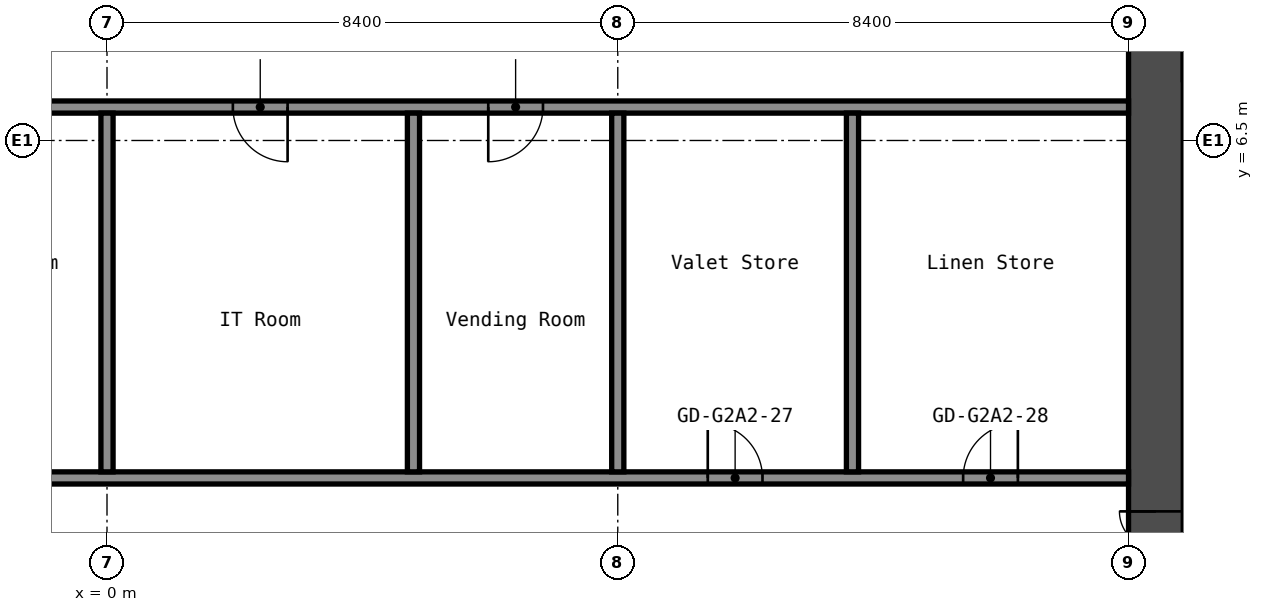
"""IFC4 building model, lengths in metres.
Left out: names, types, materials, properties, quantities, classifications, styles, units other than length and angle.
Written with IfcOpenShell. Run it as: python <this file> out.ifc"""

import sys

from ifc_helpers import new_model, si_unit, direction, frame, frame_2d, origin, place, context, subcontext, project, spatial, rectangle, extrude, element, fill, save


model = new_model("IFC4")
c1 = context("Model", 3, precision=1e-05, world=origin(), true_north=direction((0.0, 1.0)))
c2 = subcontext(c1, "Body", "Model", "MODEL_VIEW")
j1 = project(units=[si_unit("LENGTHUNIT", "METRE"), si_unit("PLANEANGLEUNIT", "RADIAN")], contexts=[c1])
p1 = place(None, origin())
s1 = spatial("IfcSite", under=j1, at=p1, CompositionType="ELEMENT")
p2 = place(p1, origin())
s2 = spatial("IfcBuilding", under=s1, at=p2, CompositionType="ELEMENT")
p3 = place(p2, frame((0.0, 0.0, 107.4)))
s3 = spatial("IfcBuildingStorey", under=s2, at=p3, CompositionType="ELEMENT", Elevation=107.4)
p4 = place(p3, frame((17.25, -8.4, 0.0), z_axis=(0.0, 0.0, 1.0), x_axis=(0.0, 1.0, 0.0)))
e1 = element("IfcWall", 1, at=p4, inside=s3, PredefinedType="SHEAR", context=c2, shape_type="SweptSolid", body=[
    extrude(rectangle(XDim=16.8, YDim=0.9, at=frame_2d((8.4, 0.0))), origin(), (0.0, 0.0, 1.0), 2.8),
])
p5 = place(p4, frame((7.6, 0.0, 0.0)))
e2 = element("IfcOpeningElement", 2, at=p5, cuts=e1, PredefinedType="OPENING", context=c2, shape_type="SweptSolid", body=[
    extrude(rectangle(XDim=1.2, YDim=2.1, at=frame_2d((0.6, 1.05))), frame((0.0, 0.46, 0.0), z_axis=(0.0, -1.0, 0.0), x_axis=(1.0, 0.0, 0.0)), (0.0, 0.0, 1.0), 0.92),
])
p6 = place(p3, frame((17.7, 7.95, 0.0), z_axis=(0.0, 0.0, 1.0), x_axis=(1.0, 0.0, 0.0)))
e3 = element("IfcWall", 3, at=p6, inside=s3, PredefinedType="SHEAR", context=c2, shape_type="SweptSolid", body=[
    extrude(rectangle(XDim=15.0, YDim=0.9, at=frame_2d((7.5, 0.0))), origin(), (0.0, 0.0, 1.0), 2.8),
])
p7 = place(p6, frame((10.4, 0.0, 0.0)))
e4 = element("IfcOpeningElement", 4, at=p7, cuts=e3, PredefinedType="OPENING", context=c2, shape_type="SweptSolid", body=[
    extrude(rectangle(XDim=1.2, YDim=2.1, at=frame_2d((0.6, 1.05))), frame((0.0, 0.46, 0.0), z_axis=(0.0, -1.0, 0.0), x_axis=(1.0, 0.0, 0.0)), (0.0, 0.0, 1.0), 0.92),
])
p8 = place(p6, frame((13.35, 0.0, 0.0)))
e5 = element("IfcOpeningElement", 5, at=p8, cuts=e3, PredefinedType="OPENING", context=c2, shape_type="SweptSolid", body=[
    extrude(rectangle(XDim=0.9, YDim=2.1, at=frame_2d((0.45, 1.05))), frame((0.0, 0.46, 0.0), z_axis=(0.0, -1.0, 0.0), x_axis=(1.0, 0.0, 0.0)), (0.0, 0.0, 1.0), 0.92),
])
p9 = place(p3, frame((-16.8, 0.95, 0.0), z_axis=(0.0, 0.0, 1.0), x_axis=(1.0, 0.0, 0.0)))
e6 = element("IfcWall", 6, at=p9, inside=s3, PredefinedType="PARTITIONING", context=c2, shape_type="SweptSolid", body=[
    extrude(rectangle(XDim=33.6, YDim=0.2, at=frame_2d((16.8, 0.0))), origin(), (0.0, 0.0, 1.0), 2.8),
])
p10 = place(p9, frame((9.715, 0.0, 0.0)))
e7 = element("IfcOpeningElement", 7, at=p10, cuts=e6, PredefinedType="OPENING", context=c2, shape_type="SweptSolid", body=[
    extrude(rectangle(XDim=0.9, YDim=2.1, at=frame_2d((0.45, 1.05))), frame((0.0, 0.11, 0.0), z_axis=(0.0, -1.0, 0.0), x_axis=(1.0, 0.0, 0.0)), (0.0, 0.0, 1.0), 0.22),
])
p11 = place(p9, frame((13.915, 0.0, 0.0)))
e8 = element("IfcOpeningElement", 8, at=p11, cuts=e6, PredefinedType="OPENING", context=c2, shape_type="SweptSolid", body=[
    extrude(rectangle(XDim=0.9, YDim=2.1, at=frame_2d((0.45, 1.05))), frame((0.0, 0.11, 0.0), z_axis=(0.0, -1.0, 0.0), x_axis=(1.0, 0.0, 0.0)), (0.0, 0.0, 1.0), 0.22),
])
p12 = place(p9, frame((26.68, 0.0, 0.0)))
e9 = element("IfcOpeningElement", 9, at=p12, cuts=e6, PredefinedType="OPENING", context=c2, shape_type="SweptSolid", body=[
    extrude(rectangle(XDim=0.9, YDim=2.1, at=frame_2d((0.45, 1.05))), frame((0.0, 0.11, 0.0), z_axis=(0.0, -1.0, 0.0), x_axis=(1.0, 0.0, 0.0)), (0.0, 0.0, 1.0), 0.22),
])
p13 = place(p9, frame((30.88, 0.0, 0.0)))
e10 = element("IfcOpeningElement", 10, at=p13, cuts=e6, PredefinedType="OPENING", context=c2, shape_type="SweptSolid", body=[
    extrude(rectangle(XDim=0.9, YDim=2.1, at=frame_2d((0.45, 1.05))), frame((0.0, 0.11, 0.0), z_axis=(0.0, -1.0, 0.0), x_axis=(1.0, 0.0, 0.0)), (0.0, 0.0, 1.0), 0.22),
])
p14 = place(p3, frame((-16.8, 7.05, 0.0), z_axis=(0.0, 0.0, 1.0), x_axis=(1.0, 0.0, 0.0)))
e11 = element("IfcWall", 11, at=p14, inside=s3, PredefinedType="PARTITIONING", context=c2, shape_type="SweptSolid", body=[
    extrude(rectangle(XDim=33.6, YDim=0.2, at=frame_2d((16.8, 0.0))), origin(), (0.0, 0.0, 1.0), 2.8),
])
p15 = place(p14, frame((1.9, 0.0, 0.0)))
e12 = element("IfcOpeningElement", 12, at=p15, cuts=e11, PredefinedType="OPENING", context=c2, shape_type="SweptSolid", body=[
    extrude(rectangle(XDim=0.9, YDim=2.1, at=frame_2d((0.45, 1.05))), frame((0.0, 0.11, 0.0), z_axis=(0.0, -1.0, 0.0), x_axis=(1.0, 0.0, 0.0)), (0.0, 0.0, 1.0), 0.22),
])
p16 = place(p14, frame((6.1, 0.0, 0.0)))
e13 = element("IfcOpeningElement", 13, at=p16, cuts=e11, PredefinedType="OPENING", context=c2, shape_type="SweptSolid", body=[
    extrude(rectangle(XDim=0.9, YDim=2.1, at=frame_2d((0.45, 1.05))), frame((0.0, 0.11, 0.0), z_axis=(0.0, -1.0, 0.0), x_axis=(1.0, 0.0, 0.0)), (0.0, 0.0, 1.0), 0.22),
])
p17 = place(p14, frame((18.87, 0.0, 0.0)))
e14 = element("IfcOpeningElement", 14, at=p17, cuts=e11, PredefinedType="OPENING", context=c2, shape_type="SweptSolid", body=[
    extrude(rectangle(XDim=0.9, YDim=2.1, at=frame_2d((0.45, 1.05))), frame((0.0, 0.11, 0.0), z_axis=(0.0, -1.0, 0.0), x_axis=(1.0, 0.0, 0.0)), (0.0, 0.0, 1.0), 0.22),
])
p18 = place(p14, frame((23.07, 0.0, 0.0)))
e15 = element("IfcOpeningElement", 15, at=p18, cuts=e11, PredefinedType="OPENING", context=c2, shape_type="SweptSolid", body=[
    extrude(rectangle(XDim=0.9, YDim=2.1, at=frame_2d((0.45, 1.05))), frame((0.0, 0.11, 0.0), z_axis=(0.0, -1.0, 0.0), x_axis=(1.0, 0.0, 0.0)), (0.0, 0.0, 1.0), 0.22),
])
for number, where, z_axis, x_axis in (
    (16, (0.0, 1.05, 0.0), (0.0, 0.0, 1.0), (0.0, 1.0, 0.0)),
    (17, (5.04, 1.05, 0.0), (0.0, 0.0, 1.0), (0.0, 1.0, 0.0)),
    (18, (8.4, 1.05, 0.0), (0.0, 0.0, 1.0), (0.0, 1.0, 0.0)),
    (19, (12.26, 1.05, 0.0), (0.0, 0.0, 1.0), (0.0, 1.0, 0.0)),
):
    element("IfcWall", number, at=place(p3, frame(where, z_axis=z_axis, x_axis=x_axis)), inside=s3, PredefinedType="PARTITIONING", context=c2, shape_type="SweptSolid", body=[
        extrude(rectangle(XDim=5.9, YDim=0.2, at=frame_2d((2.95, 0.0))), origin(), (0.0, 0.0, 1.0), 2.8),
    ])
p19 = place(p5, origin())
e20 = element("IfcDoor", 20, at=p19, inside=s3, OperationType="DOUBLE_DOOR_SINGLE_SWING", PredefinedType="DOOR", context=c2, shape_type="SweptSolid", body=[
    extrude(rectangle(XDim=1.2, YDim=2.1, at=frame_2d((0.6, 1.05))), frame((0.0, 0.025, 0.0), z_axis=(0.0, -1.0, 0.0), x_axis=(1.0, 0.0, 0.0)), (0.0, 0.0, 1.0), 0.05),
])
fill(e2, e20)
p20 = place(p12, origin())
e21 = element("IfcDoor", 21, at=p20, inside=s3, OperationType="SINGLE_SWING_RIGHT", PredefinedType="DOOR", context=c2, shape_type="SweptSolid", body=[
    extrude(rectangle(XDim=0.9, YDim=2.1, at=frame_2d((0.45, 1.05))), frame((0.0, 0.025, 0.0), z_axis=(0.0, -1.0, 0.0), x_axis=(1.0, 0.0, 0.0)), (0.0, 0.0, 1.0), 0.05),
])
fill(e9, e21)
p21 = place(p13, origin())
e22 = element("IfcDoor", 22, at=p21, inside=s3, OperationType="SINGLE_SWING_LEFT", PredefinedType="DOOR", context=c2, shape_type="SweptSolid", body=[
    extrude(rectangle(XDim=0.9, YDim=2.1, at=frame_2d((0.45, 1.05))), frame((0.0, 0.025, 0.0), z_axis=(0.0, -1.0, 0.0), x_axis=(1.0, 0.0, 0.0)), (0.0, 0.0, 1.0), 0.05),
])
fill(e10, e22)
p22 = place(p17, origin())
e23 = element("IfcDoor", 23, at=p22, inside=s3, OperationType="SINGLE_SWING_RIGHT", PredefinedType="DOOR", context=c2, shape_type="SweptSolid", body=[
    extrude(rectangle(XDim=0.9, YDim=2.1, at=frame_2d((0.45, 1.05))), frame((0.0, 0.025, 0.0), z_axis=(0.0, -1.0, 0.0), x_axis=(1.0, 0.0, 0.0)), (0.0, 0.0, 1.0), 0.05),
])
fill(e14, e23)
p23 = place(p18, origin())
e24 = element("IfcDoor", 24, at=p23, inside=s3, OperationType="SINGLE_SWING_LEFT", PredefinedType="DOOR", context=c2, shape_type="SweptSolid", body=[
    extrude(rectangle(XDim=0.9, YDim=2.1, at=frame_2d((0.45, 1.05))), frame((0.0, 0.025, 0.0), z_axis=(0.0, -1.0, 0.0), x_axis=(1.0, 0.0, 0.0)), (0.0, 0.0, 1.0), 0.05),
])
fill(e15, e24)
save(model, sys.argv[1])
